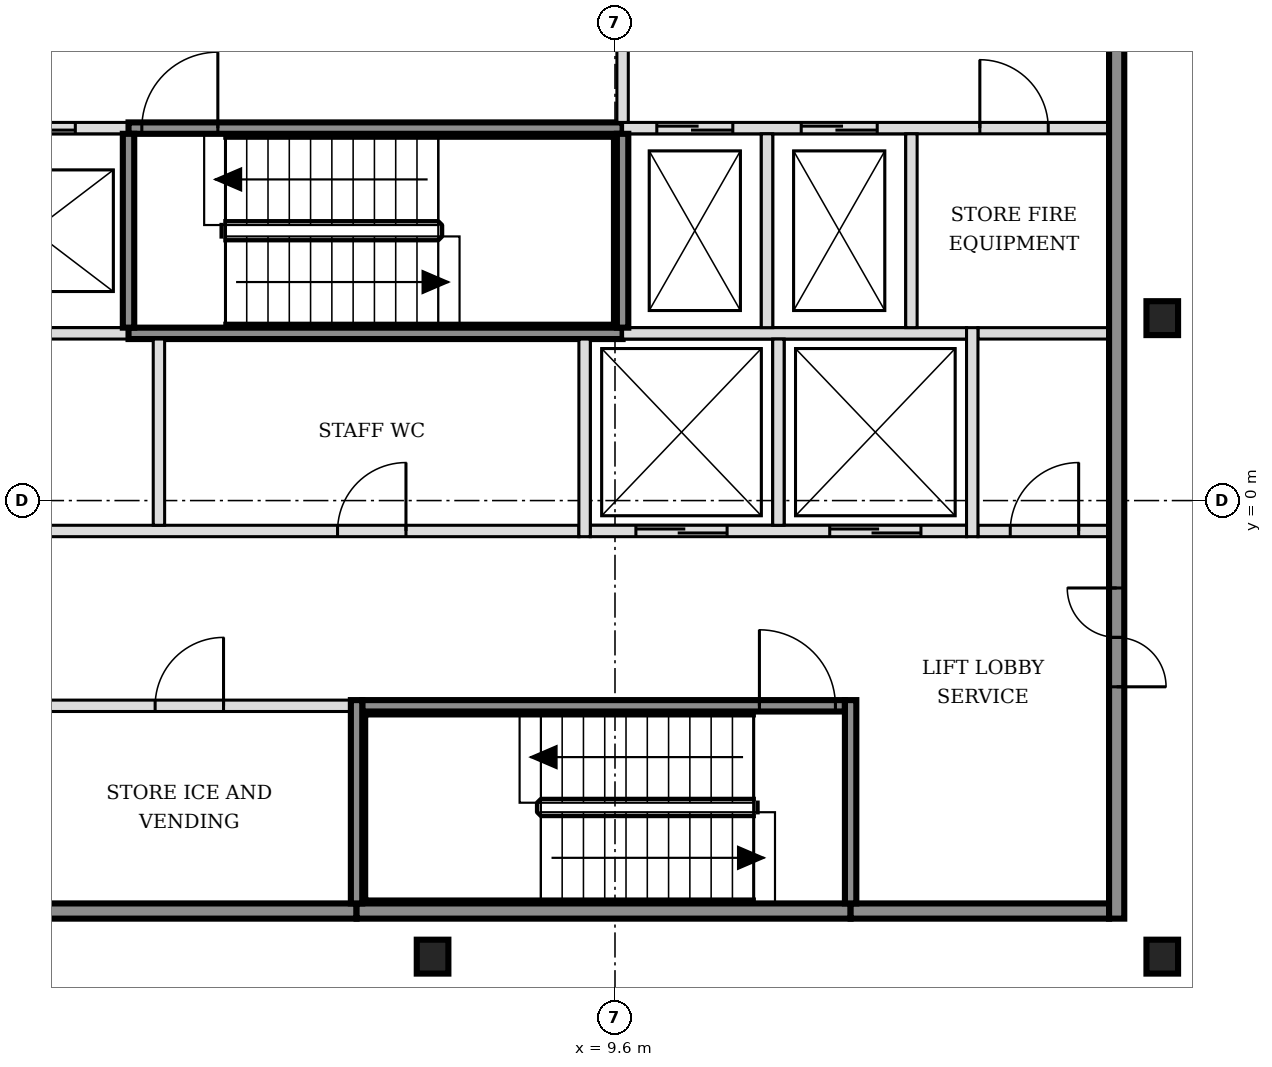
"""IFC4 building model, lengths in metres.
Left out: names, types, materials, properties, quantities, classifications, styles, units other than length and angle.
Written with IfcOpenShell. Run it as: python <this file> out.ifc"""

import sys

from ifc_helpers import new_model, si_unit, direction, frame, frame_2d, origin, origin_2d, place, context, subcontext, project, spatial, rectangle, i_section, extrude, element, fill, save


model = new_model("IFC4")
c1 = context("Model", 3, precision=1e-05, world=origin(), true_north=direction((0.0, 1.0)))
c2 = subcontext(c1, "Body", "Model", "MODEL_VIEW")
j1 = project(units=[si_unit("LENGTHUNIT", "METRE"), si_unit("PLANEANGLEUNIT", "RADIAN")], contexts=[c1])
p1 = place(None, origin())
s1 = spatial("IfcSite", under=j1, at=p1, CompositionType="ELEMENT")
p2 = place(p1, origin())
s2 = spatial("IfcBuilding", under=s1, at=p2, CompositionType="ELEMENT")
p3 = place(p2, frame((0.0, 0.0, 165.0)))
s3 = spatial("IfcBuildingStorey", under=s2, at=p3, CompositionType="ELEMENT", Elevation=165.0)
for number, where, z_axis, x_axis in (
    (1, (7.2, -6.0, -0.15), (0.0, 0.0, 1.0), (1.0, 0.0, 0.0)),
    (2, (16.8, -6.0, -0.15), (0.0, 0.0, 1.0), (1.0, 0.0, 0.0)),
    (3, (16.8, 2.4, -0.15), (0.0, 0.0, 1.0), (1.0, 0.0, 0.0)),
):
    element("IfcColumn", number, at=place(p3, frame(where, z_axis=z_axis, x_axis=x_axis)), inside=s3, PredefinedType="COLUMN", context=c2, shape_type="SweptSolid", body=[
        extrude(i_section(OverallWidth=0.416, OverallDepth=0.446, WebThickness=0.039, FlangeThickness=0.063, FilletRadius=0.015, at=origin_2d()), origin(), (0.0, 0.0, 1.0), 3.6),
    ])
p4 = place(p3, frame((-1.7, -5.4, 0.0), z_axis=(0.0, 0.0, 1.0), x_axis=(1.0, 0.0, 0.0)))
e4 = element("IfcWall", 4, at=p4, inside=s3, PredefinedType="SOLIDWALL", context=c2, shape_type="SweptSolid", body=[
    extrude(rectangle(XDim=7.9, YDim=0.2, at=frame_2d((3.95, 0.0))), origin(), (0.0, 0.0, 1.0), 3.45),
])
p5 = place(p3, frame((6.2, -5.4, 0.0), z_axis=(0.0, 0.0, 1.0), x_axis=(1.0, 0.0, 0.0)))
e5 = element("IfcWall", 5, at=p5, inside=s3, PredefinedType="SOLIDWALL", context=c2, shape_type="SweptSolid", body=[
    extrude(rectangle(XDim=6.5, YDim=0.2, at=frame_2d((3.25, 0.0))), origin(), (0.0, 0.0, 1.0), 3.45),
])
p6 = place(p3, frame((12.7, -5.4, 0.0), z_axis=(0.0, 0.0, 1.0), x_axis=(1.0, 0.0, 0.0)))
e6 = element("IfcWall", 6, at=p6, inside=s3, PredefinedType="SOLIDWALL", context=c2, shape_type="SweptSolid", body=[
    extrude(rectangle(XDim=3.4, YDim=0.2, at=frame_2d((1.7, 0.0))), origin(), (0.0, 0.0, 1.0), 3.45),
])
p7 = place(p3, frame((-1.7, -2.7, 0.0), z_axis=(0.0, 0.0, 1.0), x_axis=(1.0, 0.0, 0.0)))
e7 = element("IfcWall", 7, at=p7, inside=s3, PredefinedType="PARTITIONING", context=c2, shape_type="SweptSolid", body=[
    extrude(rectangle(XDim=7.825, YDim=0.15, at=frame_2d((3.913, 0.0))), origin(), (0.0, 0.0, 1.0), 3.45),
])
p8 = place(p7, frame((1.25, 0.0, 0.0)))
e8 = element("IfcOpeningElement", 8, at=p8, cuts=e7, PredefinedType="OPENING", context=c2, shape_type="SweptSolid", body=[
    extrude(rectangle(XDim=0.9, YDim=2.1, at=frame_2d((0.45, 1.05))), frame((0.0, 0.085, 0.0), z_axis=(0.0, -1.0, 0.0), x_axis=(1.0, 0.0, 0.0)), (0.0, 0.0, 1.0), 0.17),
])
p9 = place(p7, frame((5.25, 0.0, 0.0)))
e9 = element("IfcOpeningElement", 9, at=p9, cuts=e7, PredefinedType="OPENING", context=c2, shape_type="SweptSolid", body=[
    extrude(rectangle(XDim=0.9, YDim=2.1, at=frame_2d((0.45, 1.05))), frame((0.0, 0.085, 0.0), z_axis=(0.0, -1.0, 0.0), x_axis=(1.0, 0.0, 0.0)), (0.0, 0.0, 1.0), 0.17),
])
p10 = place(p3, frame((6.275, -2.7, 0.0), z_axis=(0.0, 0.0, 1.0), x_axis=(1.0, 0.0, 0.0)))
e10 = element("IfcWall", 10, at=p10, inside=s3, PredefinedType="SOLIDWALL", context=c2, shape_type="SweptSolid", body=[
    extrude(rectangle(XDim=6.35, YDim=0.15, at=frame_2d((3.175, 0.0))), origin(), (0.0, 0.0, 1.0), 3.45),
])
p11 = place(p10, frame((5.225, 0.0, 0.0)))
e11 = element("IfcOpeningElement", 11, at=p11, cuts=e10, PredefinedType="OPENING", context=c2, shape_type="SweptSolid", body=[
    extrude(rectangle(XDim=1.0, YDim=2.1, at=frame_2d((0.5, 1.05))), frame((0.0, 0.085, 0.0), z_axis=(0.0, -1.0, 0.0), x_axis=(1.0, 0.0, 0.0)), (0.0, 0.0, 1.0), 0.17),
])
p12 = place(p3, frame((-1.7, -0.4, 0.0), z_axis=(0.0, 0.0, 1.0), x_axis=(1.0, 0.0, 0.0)))
e12 = element("IfcWall", 12, at=p12, inside=s3, PredefinedType="PARTITIONING", context=c2, shape_type="SweptSolid", body=[
    extrude(rectangle(XDim=10.825, YDim=0.15, at=frame_2d((5.413, 0.0))), origin(), (0.0, 0.0, 1.0), 3.45),
])
p13 = place(p12, frame((2.15, 0.0, 0.0)))
e13 = element("IfcOpeningElement", 13, at=p13, cuts=e12, PredefinedType="OPENING", context=c2, shape_type="SweptSolid", body=[
    extrude(rectangle(XDim=0.9, YDim=2.1, at=frame_2d((0.45, 1.05))), frame((0.0, 0.085, 0.0), z_axis=(0.0, -1.0, 0.0), x_axis=(1.0, 0.0, 0.0)), (0.0, 0.0, 1.0), 0.17),
])
p14 = place(p12, frame((7.65, 0.0, 0.0)))
e14 = element("IfcOpeningElement", 14, at=p14, cuts=e12, PredefinedType="OPENING", context=c2, shape_type="SweptSolid", body=[
    extrude(rectangle(XDim=0.9, YDim=2.1, at=frame_2d((0.45, 1.05))), frame((0.0, 0.085, 0.0), z_axis=(0.0, -1.0, 0.0), x_axis=(1.0, 0.0, 0.0)), (0.0, 0.0, 1.0), 0.17),
])
p15 = place(p3, frame((9.275, -0.4, 0.0), z_axis=(0.0, 0.0, 1.0), x_axis=(1.0, 0.0, 0.0)))
e15 = element("IfcWall", 15, at=p15, inside=s3, PredefinedType="SOLIDWALL", context=c2, shape_type="SweptSolid", body=[
    extrude(rectangle(XDim=4.95, YDim=0.15, at=frame_2d((2.475, 0.0))), origin(), (0.0, 0.0, 1.0), 3.45),
])
p16 = place(p15, frame((0.6, 0.0, 0.0)))
e16 = element("IfcOpeningElement", 16, at=p16, cuts=e15, PredefinedType="OPENING", context=c2, shape_type="SweptSolid", body=[
    extrude(rectangle(XDim=1.2, YDim=2.1, at=frame_2d((0.6, 1.05))), frame((0.0, 0.085, 0.0), z_axis=(0.0, -1.0, 0.0), x_axis=(1.0, 0.0, 0.0)), (0.0, 0.0, 1.0), 0.17),
])
p17 = place(p15, frame((3.15, 0.0, 0.0)))
e17 = element("IfcOpeningElement", 17, at=p17, cuts=e15, PredefinedType="OPENING", context=c2, shape_type="SweptSolid", body=[
    extrude(rectangle(XDim=1.2, YDim=2.1, at=frame_2d((0.6, 1.05))), frame((0.0, 0.085, 0.0), z_axis=(0.0, -1.0, 0.0), x_axis=(1.0, 0.0, 0.0)), (0.0, 0.0, 1.0), 0.17),
])
p18 = place(p3, frame((14.375, -0.4, 0.0), z_axis=(0.0, 0.0, 1.0), x_axis=(1.0, 0.0, 0.0)))
e18 = element("IfcWall", 18, at=p18, inside=s3, PredefinedType="PARTITIONING", context=c2, shape_type="SweptSolid", body=[
    extrude(rectangle(XDim=1.725, YDim=0.15, at=frame_2d((0.863, 0.0))), origin(), (0.0, 0.0, 1.0), 3.45),
])
p19 = place(p18, frame((0.425, 0.0, 0.0)))
e19 = element("IfcOpeningElement", 19, at=p19, cuts=e18, PredefinedType="OPENING", context=c2, shape_type="SweptSolid", body=[
    extrude(rectangle(XDim=0.9, YDim=2.1, at=frame_2d((0.45, 1.05))), frame((0.0, 0.085, 0.0), z_axis=(0.0, -1.0, 0.0), x_axis=(1.0, 0.0, 0.0)), (0.0, 0.0, 1.0), 0.17),
])
p20 = place(p3, frame((-1.7, 2.2, 0.0), z_axis=(0.0, 0.0, 1.0), x_axis=(1.0, 0.0, 0.0)))
e20 = element("IfcWall", 20, at=p20, inside=s3, PredefinedType="SOLIDWALL", context=c2, shape_type="SweptSolid", body=[
    extrude(rectangle(XDim=4.9, YDim=0.15, at=frame_2d((2.45, 0.0))), origin(), (0.0, 0.0, 1.0), 3.45),
])
p21 = place(p3, frame((3.2, 2.2, 0.0), z_axis=(0.0, 0.0, 1.0), x_axis=(1.0, 0.0, 0.0)))
e21 = element("IfcWall", 21, at=p21, inside=s3, PredefinedType="SOLIDWALL", context=c2, shape_type="SweptSolid", body=[
    extrude(rectangle(XDim=6.5, YDim=0.15, at=frame_2d((3.25, 0.0))), origin(), (0.0, 0.0, 1.0), 3.45),
])
p22 = place(p3, frame((9.7, 2.2, 0.0), z_axis=(0.0, 0.0, 1.0), x_axis=(1.0, 0.0, 0.0)))
e22 = element("IfcWall", 22, at=p22, inside=s3, PredefinedType="SOLIDWALL", context=c2, shape_type="SweptSolid", body=[
    extrude(rectangle(XDim=4.525, YDim=0.15, at=frame_2d((2.263, 0.0))), origin(), (0.0, 0.0, 1.0), 3.45),
])
p23 = place(p3, frame((14.375, 2.2, 0.0), z_axis=(0.0, 0.0, 1.0), x_axis=(1.0, 0.0, 0.0)))
e23 = element("IfcWall", 23, at=p23, inside=s3, PredefinedType="PARTITIONING", context=c2, shape_type="SweptSolid", body=[
    extrude(rectangle(XDim=1.725, YDim=0.15, at=frame_2d((0.863, 0.0))), origin(), (0.0, 0.0, 1.0), 3.45),
])
p24 = place(p3, frame((-1.7, 4.9, 0.0), z_axis=(0.0, 0.0, 1.0), x_axis=(1.0, 0.0, 0.0)))
e24 = element("IfcWall", 24, at=p24, inside=s3, PredefinedType="SOLIDWALL", context=c2, shape_type="SweptSolid", body=[
    extrude(rectangle(XDim=4.9, YDim=0.15, at=frame_2d((2.45, 0.0))), origin(), (0.0, 0.0, 1.0), 3.45),
])
p25 = place(p24, frame((0.6, 0.0, 0.0)))
e25 = element("IfcOpeningElement", 25, at=p25, cuts=e24, PredefinedType="OPENING", context=c2, shape_type="SweptSolid", body=[
    extrude(rectangle(XDim=1.1, YDim=2.1, at=frame_2d((0.55, 1.05))), frame((0.0, 0.085, 0.0), z_axis=(0.0, -1.0, 0.0), x_axis=(1.0, 0.0, 0.0)), (0.0, 0.0, 1.0), 0.17),
])
p26 = place(p24, frame((3.1, 0.0, 0.0)))
e26 = element("IfcOpeningElement", 26, at=p26, cuts=e24, PredefinedType="OPENING", context=c2, shape_type="SweptSolid", body=[
    extrude(rectangle(XDim=1.1, YDim=2.1, at=frame_2d((0.55, 1.05))), frame((0.0, 0.085, 0.0), z_axis=(0.0, -1.0, 0.0), x_axis=(1.0, 0.0, 0.0)), (0.0, 0.0, 1.0), 0.17),
])
p27 = place(p3, frame((3.2, 4.9, 0.0), z_axis=(0.0, 0.0, 1.0), x_axis=(1.0, 0.0, 0.0)))
e27 = element("IfcWall", 27, at=p27, inside=s3, PredefinedType="SOLIDWALL", context=c2, shape_type="SweptSolid", body=[
    extrude(rectangle(XDim=6.5, YDim=0.15, at=frame_2d((3.25, 0.0))), origin(), (0.0, 0.0, 1.0), 3.45),
])
p28 = place(p27, frame((0.175, 0.0, 0.0)))
e28 = element("IfcOpeningElement", 28, at=p28, cuts=e27, PredefinedType="OPENING", context=c2, shape_type="SweptSolid", body=[
    extrude(rectangle(XDim=1.0, YDim=2.1, at=frame_2d((0.5, 1.05))), frame((0.0, 0.085, 0.0), z_axis=(0.0, -1.0, 0.0), x_axis=(1.0, 0.0, 0.0)), (0.0, 0.0, 1.0), 0.17),
])
p29 = place(p3, frame((9.7, 4.9, 0.0), z_axis=(0.0, 0.0, 1.0), x_axis=(1.0, 0.0, 0.0)))
e29 = element("IfcWall", 29, at=p29, inside=s3, PredefinedType="SOLIDWALL", context=c2, shape_type="SweptSolid", body=[
    extrude(rectangle(XDim=6.4, YDim=0.15, at=frame_2d((3.2, 0.0))), origin(), (0.0, 0.0, 1.0), 3.45),
])
p30 = place(p29, frame((0.45, 0.0, 0.0)))
e30 = element("IfcOpeningElement", 30, at=p30, cuts=e29, PredefinedType="OPENING", context=c2, shape_type="SweptSolid", body=[
    extrude(rectangle(XDim=1.0, YDim=2.1, at=frame_2d((0.5, 1.05))), frame((0.0, 0.085, 0.0), z_axis=(0.0, -1.0, 0.0), x_axis=(1.0, 0.0, 0.0)), (0.0, 0.0, 1.0), 0.17),
])
p31 = place(p29, frame((2.35, 0.0, 0.0)))
e31 = element("IfcOpeningElement", 31, at=p31, cuts=e29, PredefinedType="OPENING", context=c2, shape_type="SweptSolid", body=[
    extrude(rectangle(XDim=1.0, YDim=2.1, at=frame_2d((0.5, 1.05))), frame((0.0, 0.085, 0.0), z_axis=(0.0, -1.0, 0.0), x_axis=(1.0, 0.0, 0.0)), (0.0, 0.0, 1.0), 0.17),
])
p32 = place(p29, frame((4.7, 0.0, 0.0)))
e32 = element("IfcOpeningElement", 32, at=p32, cuts=e29, PredefinedType="OPENING", context=c2, shape_type="SweptSolid", body=[
    extrude(rectangle(XDim=0.9, YDim=2.1, at=frame_2d((0.45, 1.05))), frame((0.0, 0.085, 0.0), z_axis=(0.0, -1.0, 0.0), x_axis=(1.0, 0.0, 0.0)), (0.0, 0.0, 1.0), 0.17),
])
p33 = place(p3, frame((3.2, 2.275, 0.0), z_axis=(0.0, 0.0, 1.0), x_axis=(0.0, 1.0, 0.0)))
e33 = element("IfcWall", 33, at=p33, inside=s3, PredefinedType="SOLIDWALL", context=c2, shape_type="SweptSolid", body=[
    extrude(rectangle(XDim=2.55, YDim=0.15, at=frame_2d((1.275, 0.0))), origin(), (0.0, 0.0, 1.0), 3.45),
])
p34 = place(p3, frame((3.6, -0.325, 0.0), z_axis=(0.0, 0.0, 1.0), x_axis=(0.0, 1.0, 0.0)))
e34 = element("IfcWall", 34, at=p34, inside=s3, PredefinedType="PARTITIONING", context=c2, shape_type="SweptSolid", body=[
    extrude(rectangle(XDim=2.45, YDim=0.15, at=frame_2d((1.225, 0.0))), origin(), (0.0, 0.0, 1.0), 3.45),
])
p35 = place(p3, frame((6.2, -5.3, 0.0), z_axis=(0.0, 0.0, 1.0), x_axis=(0.0, 1.0, 0.0)))
e35 = element("IfcWall", 35, at=p35, inside=s3, PredefinedType="SOLIDWALL", context=c2, shape_type="SweptSolid", body=[
    extrude(rectangle(XDim=2.675, YDim=0.15, at=frame_2d((1.337, 0.0))), origin(), (0.0, 0.0, 1.0), 3.45),
])
p36 = place(p3, frame((9.2, -0.475, 0.0), z_axis=(0.0, 0.0, 1.0), x_axis=(0.0, 1.0, 0.0)))
e36 = element("IfcWall", 36, at=p36, inside=s3, PredefinedType="SOLIDWALL", context=c2, shape_type="SweptSolid", body=[
    extrude(rectangle(XDim=2.6, YDim=0.15, at=frame_2d((1.3, 0.0))), origin(), (0.0, 0.0, 1.0), 3.45),
])
p37 = place(p3, frame((9.7, 2.275, 0.0), z_axis=(0.0, 0.0, 1.0), x_axis=(0.0, 1.0, 0.0)))
e37 = element("IfcWall", 37, at=p37, inside=s3, PredefinedType="SOLIDWALL", context=c2, shape_type="SweptSolid", body=[
    extrude(rectangle(XDim=2.55, YDim=0.15, at=frame_2d((1.275, 0.0))), origin(), (0.0, 0.0, 1.0), 3.45),
])
p38 = place(p3, frame((9.7, 4.975, 0.0), z_axis=(0.0, 0.0, 1.0), x_axis=(0.0, 1.0, 0.0)))
e38 = element("IfcWall", 38, at=p38, inside=s3, PredefinedType="SOLIDWALL", context=c2, shape_type="SweptSolid", body=[
    extrude(rectangle(XDim=2.45, YDim=0.15, at=frame_2d((1.225, 0.0))), origin(), (0.0, 0.0, 1.0), 3.45),
])
p39 = place(p3, frame((11.6, 2.275, 0.0), z_axis=(0.0, 0.0, 1.0), x_axis=(0.0, 1.0, 0.0)))
e39 = element("IfcWall", 39, at=p39, inside=s3, PredefinedType="SOLIDWALL", context=c2, shape_type="SweptSolid", body=[
    extrude(rectangle(XDim=2.55, YDim=0.15, at=frame_2d((1.275, 0.0))), origin(), (0.0, 0.0, 1.0), 3.45),
])
p40 = place(p3, frame((11.75, -0.325, 0.0), z_axis=(0.0, 0.0, 1.0), x_axis=(0.0, 1.0, 0.0)))
e40 = element("IfcWall", 40, at=p40, inside=s3, PredefinedType="SOLIDWALL", context=c2, shape_type="SweptSolid", body=[
    extrude(rectangle(XDim=2.45, YDim=0.15, at=frame_2d((1.225, 0.0))), origin(), (0.0, 0.0, 1.0), 3.45),
])
p41 = place(p3, frame((12.7, -5.3, 0.0), z_axis=(0.0, 0.0, 1.0), x_axis=(0.0, 1.0, 0.0)))
e41 = element("IfcWall", 41, at=p41, inside=s3, PredefinedType="SOLIDWALL", context=c2, shape_type="SweptSolid", body=[
    extrude(rectangle(XDim=2.675, YDim=0.15, at=frame_2d((1.337, 0.0))), origin(), (0.0, 0.0, 1.0), 3.45),
])
p42 = place(p3, frame((13.5, 2.275, 0.0), z_axis=(0.0, 0.0, 1.0), x_axis=(0.0, 1.0, 0.0)))
e42 = element("IfcWall", 42, at=p42, inside=s3, PredefinedType="SOLIDWALL", context=c2, shape_type="SweptSolid", body=[
    extrude(rectangle(XDim=2.55, YDim=0.15, at=frame_2d((1.275, 0.0))), origin(), (0.0, 0.0, 1.0), 3.45),
])
p43 = place(p3, frame((14.3, -0.475, 0.0), z_axis=(0.0, 0.0, 1.0), x_axis=(0.0, 1.0, 0.0)))
e43 = element("IfcWall", 43, at=p43, inside=s3, PredefinedType="SOLIDWALL", context=c2, shape_type="SweptSolid", body=[
    extrude(rectangle(XDim=2.75, YDim=0.15, at=frame_2d((1.375, 0.0))), origin(), (0.0, 0.0, 1.0), 3.45),
])
p44 = place(p3, frame((16.2, -5.5, 0.0), z_axis=(0.0, 0.0, 1.0), x_axis=(0.0, 1.0, 0.0)))
e44 = element("IfcWall", 44, at=p44, inside=s3, PredefinedType="SOLIDWALL", context=c2, shape_type="SweptSolid", body=[
    extrude(rectangle(XDim=15.8, YDim=0.2, at=frame_2d((7.9, 0.0))), origin(), (0.0, 0.0, 1.0), 3.45),
])
p45 = place(p44, frame((3.05, 0.0, 0.0)))
e45 = element("IfcOpeningElement", 45, at=p45, cuts=e44, PredefinedType="OPENING", context=c2, shape_type="SweptSolid", body=[
    extrude(rectangle(XDim=1.3, YDim=2.1, at=frame_2d((0.65, 1.05))), frame((0.0, 0.11, 0.0), z_axis=(0.0, -1.0, 0.0), x_axis=(1.0, 0.0, 0.0)), (0.0, 0.0, 1.0), 0.22),
])
p46 = place(p44, frame((11.45, 0.0, 0.0)))
e46 = element("IfcOpeningElement", 46, at=p46, cuts=e44, PredefinedType="OPENING", context=c2, shape_type="SweptSolid", body=[
    extrude(rectangle(XDim=1.3, YDim=2.1, at=frame_2d((0.65, 1.05))), frame((0.0, 0.11, 0.0), z_axis=(0.0, -1.0, 0.0), x_axis=(1.0, 0.0, 0.0)), (0.0, 0.0, 1.0), 0.22),
])
p47 = place(p16, origin())
e47 = element("IfcDoor", 47, at=p47, inside=s3, OperationType="DOUBLE_DOOR_SLIDING", PredefinedType="DOOR", context=c2, shape_type="SweptSolid", body=[
    extrude(rectangle(XDim=1.2, YDim=2.1, at=frame_2d((0.6, 1.05))), frame((0.0, 0.025, 0.0), z_axis=(0.0, -1.0, 0.0), x_axis=(1.0, 0.0, 0.0)), (0.0, 0.0, 1.0), 0.05),
])
fill(e16, e47)
p48 = place(p17, origin())
e48 = element("IfcDoor", 48, at=p48, inside=s3, OperationType="DOUBLE_DOOR_SLIDING", PredefinedType="DOOR", context=c2, shape_type="SweptSolid", body=[
    extrude(rectangle(XDim=1.2, YDim=2.1, at=frame_2d((0.6, 1.05))), frame((0.0, 0.025, 0.0), z_axis=(0.0, -1.0, 0.0), x_axis=(1.0, 0.0, 0.0)), (0.0, 0.0, 1.0), 0.05),
])
fill(e17, e48)
p49 = place(p26, origin())
e49 = element("IfcDoor", 49, at=p49, inside=s3, OperationType="DOUBLE_DOOR_SLIDING", PredefinedType="DOOR", context=c2, shape_type="SweptSolid", body=[
    extrude(rectangle(XDim=1.1, YDim=2.1, at=frame_2d((0.55, 1.05))), frame((0.0, 0.025, 0.0), z_axis=(0.0, -1.0, 0.0), x_axis=(1.0, 0.0, 0.0)), (0.0, 0.0, 1.0), 0.05),
])
fill(e26, e49)
p50 = place(p30, origin())
e50 = element("IfcDoor", 50, at=p50, inside=s3, OperationType="DOUBLE_DOOR_SLIDING", PredefinedType="DOOR", context=c2, shape_type="SweptSolid", body=[
    extrude(rectangle(XDim=1.0, YDim=2.1, at=frame_2d((0.5, 1.05))), frame((0.0, 0.025, 0.0), z_axis=(0.0, -1.0, 0.0), x_axis=(1.0, 0.0, 0.0)), (0.0, 0.0, 1.0), 0.05),
])
fill(e30, e50)
p51 = place(p31, origin())
e51 = element("IfcDoor", 51, at=p51, inside=s3, OperationType="DOUBLE_DOOR_SLIDING", PredefinedType="DOOR", context=c2, shape_type="SweptSolid", body=[
    extrude(rectangle(XDim=1.0, YDim=2.1, at=frame_2d((0.5, 1.05))), frame((0.0, 0.025, 0.0), z_axis=(0.0, -1.0, 0.0), x_axis=(1.0, 0.0, 0.0)), (0.0, 0.0, 1.0), 0.05),
])
fill(e31, e51)
p52 = place(p11, origin())
e52 = element("IfcDoor", 52, at=p52, inside=s3, OperationType="SINGLE_SWING_LEFT", PredefinedType="DOOR", context=c2, shape_type="SweptSolid", body=[
    extrude(rectangle(XDim=1.0, YDim=2.1, at=frame_2d((0.5, 1.05))), frame((0.0, 0.025, 0.0), z_axis=(0.0, -1.0, 0.0), x_axis=(1.0, 0.0, 0.0)), (0.0, 0.0, 1.0), 0.05),
])
fill(e11, e52)
p53 = place(p28, origin())
e53 = element("IfcDoor", 53, at=p53, inside=s3, OperationType="SINGLE_SWING_RIGHT", PredefinedType="DOOR", context=c2, shape_type="SweptSolid", body=[
    extrude(rectangle(XDim=1.0, YDim=2.1, at=frame_2d((0.5, 1.05))), frame((0.0, 0.025, 0.0), z_axis=(0.0, -1.0, 0.0), x_axis=(1.0, 0.0, 0.0)), (0.0, 0.0, 1.0), 0.05),
])
fill(e28, e53)
p54 = place(p45, origin())
e54 = element("IfcDoor", 54, at=p54, inside=s3, OperationType="DOUBLE_DOOR_SINGLE_SWING", PredefinedType="DOOR", context=c2, shape_type="SweptSolid", body=[
    extrude(rectangle(XDim=1.3, YDim=2.1, at=frame_2d((0.65, 1.05))), frame((0.0, 0.025, 0.0), z_axis=(0.0, -1.0, 0.0), x_axis=(1.0, 0.0, 0.0)), (0.0, 0.0, 1.0), 0.05),
])
fill(e45, e54)
p55 = place(p19, origin())
e55 = element("IfcDoor", 55, at=p55, inside=s3, OperationType="SINGLE_SWING_RIGHT", PredefinedType="DOOR", context=c2, shape_type="SweptSolid", body=[
    extrude(rectangle(XDim=0.9, YDim=2.1, at=frame_2d((0.45, 1.05))), frame((0.0, 0.025, 0.0), z_axis=(0.0, -1.0, 0.0), x_axis=(1.0, 0.0, 0.0)), (0.0, 0.0, 1.0), 0.05),
])
fill(e19, e55)
p56 = place(p32, origin())
e56 = element("IfcDoor", 56, at=p56, inside=s3, OperationType="SINGLE_SWING_LEFT", PredefinedType="DOOR", context=c2, shape_type="SweptSolid", body=[
    extrude(rectangle(XDim=0.9, YDim=2.1, at=frame_2d((0.45, 1.05))), frame((0.0, 0.025, 0.0), z_axis=(0.0, -1.0, 0.0), x_axis=(1.0, 0.0, 0.0)), (0.0, 0.0, 1.0), 0.05),
])
fill(e32, e56)
p57 = place(p9, origin())
e57 = element("IfcDoor", 57, at=p57, inside=s3, OperationType="SINGLE_SWING_RIGHT", PredefinedType="DOOR", context=c2, shape_type="SweptSolid", body=[
    extrude(rectangle(XDim=0.9, YDim=2.1, at=frame_2d((0.45, 1.05))), frame((0.0, 0.025, 0.0), z_axis=(0.0, -1.0, 0.0), x_axis=(1.0, 0.0, 0.0)), (0.0, 0.0, 1.0), 0.05),
])
fill(e9, e57)
p58 = place(p14, origin())
e58 = element("IfcDoor", 58, at=p58, inside=s3, OperationType="SINGLE_SWING_RIGHT", PredefinedType="DOOR", context=c2, shape_type="SweptSolid", body=[
    extrude(rectangle(XDim=0.9, YDim=2.1, at=frame_2d((0.45, 1.05))), frame((0.0, 0.025, 0.0), z_axis=(0.0, -1.0, 0.0), x_axis=(1.0, 0.0, 0.0)), (0.0, 0.0, 1.0), 0.05),
])
fill(e14, e58)
save(model, sys.argv[1])
